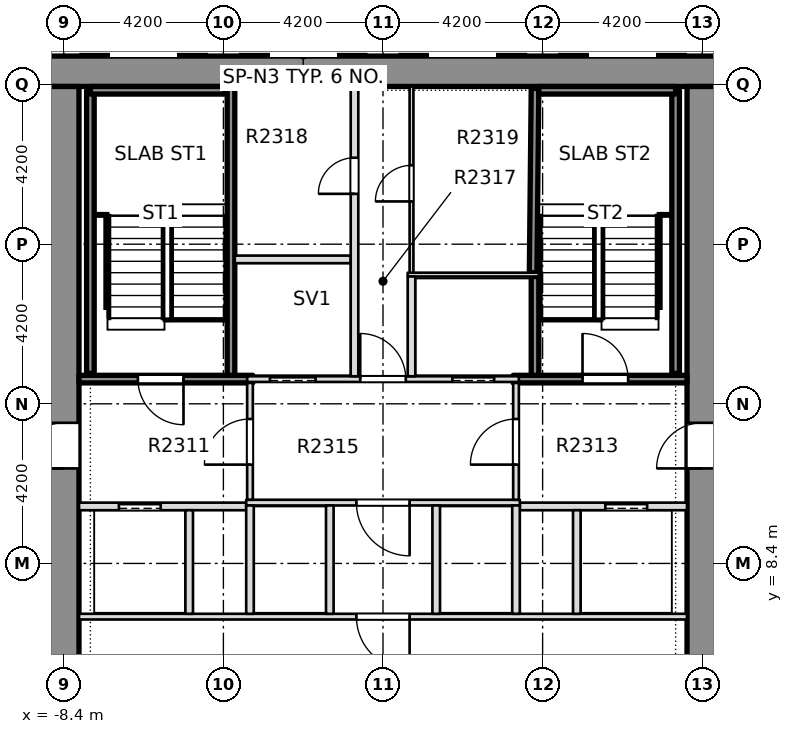
"""IFC4 building model, lengths in metres.
Left out: names, types, materials, properties, quantities, classifications, styles, units other than length and angle.
Written with IfcOpenShell. Run it as: python <this file> out.ifc"""

import sys

from ifc_helpers import new_model, si_unit, direction, frame, frame_2d, origin, place, context, subcontext, project, spatial, rectangle, extrude, element, fill, save


model = new_model("IFC4")
c1 = context("Model", 3, precision=1e-05, world=origin(), true_north=direction((0.0, 1.0)))
c2 = subcontext(c1, "Body", "Model", "MODEL_VIEW")
j1 = project(units=[si_unit("LENGTHUNIT", "METRE"), si_unit("PLANEANGLEUNIT", "RADIAN")], contexts=[c1])
p1 = place(None, origin())
s1 = spatial("IfcSite", under=j1, at=p1, CompositionType="ELEMENT")
p2 = place(p1, origin())
s2 = spatial("IfcBuilding", under=s1, at=p2, CompositionType="ELEMENT")
p3 = place(p2, frame((0.0, 0.0, 94.2)))
s3 = spatial("IfcBuildingStorey", under=s2, at=p3, CompositionType="ELEMENT", Elevation=94.2)
p4 = place(p3, frame((-11.8, 21.35, -0.32), z_axis=(0.0, 0.0, 1.0), x_axis=(1.0, 0.0, 0.0)))
e1 = element("IfcWall", 1, at=p4, inside=s3, PredefinedType="SHEAR", context=c2, shape_type="SweptSolid", body=[
    extrude(rectangle(XDim=23.6, YDim=0.8, at=frame_2d((11.8, 0.0))), origin(), (0.0, 0.0, 1.0), 3.45),
])
p5 = place(p3, frame((-8.4, -7.6, -0.32), z_axis=(0.0, 0.0, 1.0), x_axis=(0.0, 1.0, 0.0)))
e2 = element("IfcWall", 2, at=p5, inside=s3, PredefinedType="SHEAR", context=c2, shape_type="SweptSolid", body=[
    extrude(rectangle(XDim=28.55, YDim=0.8, at=frame_2d((14.275, 0.0))), origin(), (0.0, 0.0, 1.0), 3.45),
])
p6 = place(p5, frame((18.5, 0.0, 0.32)))
e3 = element("IfcOpeningElement", 3, at=p6, cuts=e2, PredefinedType="OPENING", context=c2, shape_type="SweptSolid", body=[
    extrude(rectangle(XDim=1.2, YDim=2.1, at=frame_2d((0.6, 1.05))), frame((0.0, 0.41, 0.0), z_axis=(0.0, -1.0, 0.0), x_axis=(1.0, 0.0, 0.0)), (0.0, 0.0, 1.0), 0.82),
])
p7 = place(p3, frame((8.4, -7.6, -0.32), z_axis=(0.0, 0.0, 1.0), x_axis=(0.0, 1.0, 0.0)))
e4 = element("IfcWall", 4, at=p7, inside=s3, PredefinedType="SHEAR", context=c2, shape_type="SweptSolid", body=[
    extrude(rectangle(XDim=28.55, YDim=0.8, at=frame_2d((14.275, 0.0))), origin(), (0.0, 0.0, 1.0), 3.45),
])
p8 = place(p7, frame((18.5, 0.0, 0.32)))
e5 = element("IfcOpeningElement", 5, at=p8, cuts=e4, PredefinedType="OPENING", context=c2, shape_type="SweptSolid", body=[
    extrude(rectangle(XDim=1.2, YDim=2.1, at=frame_2d((0.6, 1.05))), frame((0.0, 0.41, 0.0), z_axis=(0.0, -1.0, 0.0), x_axis=(1.0, 0.0, 0.0)), (0.0, 0.0, 1.0), 0.82),
])
p9 = place(p3, frame((-7.999, 7.0, 0.0), z_axis=(0.0, 0.0, 1.0), x_axis=(1.0, 0.0, 0.0)))
e6 = element("IfcWall", 6, at=p9, inside=s3, PredefinedType="PARTITIONING", context=c2, shape_type="SweptSolid", body=[
    extrude(rectangle(XDim=15.998, YDim=0.15, at=frame_2d((7.999, 0.0))), origin(), (0.0, 0.0, 1.0), 3.13),
])
p10 = place(p9, frame((7.299, 0.0, 0.0)))
e7 = element("IfcOpeningElement", 7, at=p10, cuts=e6, PredefinedType="OPENING", context=c2, shape_type="SweptSolid", body=[
    extrude(rectangle(XDim=1.4, YDim=2.1, at=frame_2d((0.7, 1.05))), frame((0.0, 0.085, 0.0), z_axis=(0.0, -1.0, 0.0), x_axis=(1.0, 0.0, 0.0)), (0.0, 0.0, 1.0), 0.17),
])
p11 = place(p3, frame((-7.999, 9.9, 0.0), z_axis=(0.0, 0.0, 1.0), x_axis=(1.0, 0.0, 0.0)))
e8 = element("IfcWall", 8, at=p11, inside=s3, PredefinedType="PARTITIONING", context=c2, shape_type="SweptSolid", body=[
    extrude(rectangle(XDim=4.399, YDim=0.2, at=frame_2d((2.199, 0.0))), origin(), (0.0, 0.0, 1.0), 3.13),
])
p12 = place(p11, frame((1.049, 0.0, 0.0)))
e9 = element("IfcOpeningElement", 9, at=p12, cuts=e8, PredefinedType="OPENING", context=c2, shape_type="SweptSolid", body=[
    extrude(rectangle(XDim=1.1, YDim=2.1, at=frame_2d((0.55, 1.05))), frame((0.0, 0.11, 0.0), z_axis=(0.0, -1.0, 0.0), x_axis=(1.0, 0.0, 0.0)), (0.0, 0.0, 1.0), 0.22),
])
p13 = place(p3, frame((3.6, 9.9, 0.0), z_axis=(0.0, 0.0, 1.0), x_axis=(1.0, 0.0, 0.0)))
e10 = element("IfcWall", 10, at=p13, inside=s3, PredefinedType="PARTITIONING", context=c2, shape_type="SweptSolid", body=[
    extrude(rectangle(XDim=4.399, YDim=0.2, at=frame_2d((2.199, 0.0))), origin(), (0.0, 0.0, 1.0), 3.13),
])
p14 = place(p13, frame((2.25, 0.0, 0.0)))
e11 = element("IfcOpeningElement", 11, at=p14, cuts=e10, PredefinedType="OPENING", context=c2, shape_type="SweptSolid", body=[
    extrude(rectangle(XDim=1.1, YDim=2.1, at=frame_2d((0.55, 1.05))), frame((0.0, 0.11, 0.0), z_axis=(0.0, -1.0, 0.0), x_axis=(1.0, 0.0, 0.0)), (0.0, 0.0, 1.0), 0.22),
])
p15 = place(p3, frame((-3.6, 10.0, 0.0), z_axis=(0.0, 0.0, 1.0), x_axis=(1.0, 0.0, 0.0)))
e12 = element("IfcWall", 12, at=p15, inside=s3, PredefinedType="PARTITIONING", context=c2, shape_type="SweptSolid", body=[
    extrude(rectangle(XDim=7.2, YDim=0.15, at=frame_2d((3.6, 0.0))), origin(), (0.0, 0.0, 1.0), 3.13),
])
p16 = place(p15, frame((2.9, 0.0, 0.0)))
e13 = element("IfcOpeningElement", 13, at=p16, cuts=e12, PredefinedType="OPENING", context=c2, shape_type="SweptSolid", body=[
    extrude(rectangle(XDim=1.4, YDim=2.1, at=frame_2d((0.7, 1.05))), frame((0.0, 0.085, 0.0), z_axis=(0.0, -1.0, 0.0), x_axis=(1.0, 0.0, 0.0)), (0.0, 0.0, 1.0), 0.17),
])
p17 = place(p3, frame((-7.999, 13.25, 0.0), z_axis=(0.0, 0.0, 1.0), x_axis=(1.0, 0.0, 0.0)))
e14 = element("IfcWall", 14, at=p17, inside=s3, PredefinedType="SOLIDWALL", context=c2, shape_type="SweptSolid", body=[
    extrude(rectangle(XDim=4.574, YDim=0.2, at=frame_2d((2.287, 0.0))), origin(), (0.0, 0.0, 1.0), 3.13),
])
p18 = place(p17, frame((1.549, 0.0, 0.0)))
e15 = element("IfcOpeningElement", 15, at=p18, cuts=e14, PredefinedType="OPENING", context=c2, shape_type="SweptSolid", body=[
    extrude(rectangle(XDim=1.2, YDim=2.1, at=frame_2d((0.6, 1.05))), frame((0.0, 0.11, 0.0), z_axis=(0.0, -1.0, 0.0), x_axis=(1.0, 0.0, 0.0)), (0.0, 0.0, 1.0), 0.22),
])
p19 = place(p3, frame((-3.575, 13.25, 0.0), z_axis=(0.0, 0.0, 1.0), x_axis=(1.0, 0.0, 0.0)))
e16 = element("IfcWall", 16, at=p19, inside=s3, PredefinedType="PARTITIONING", context=c2, shape_type="SweptSolid", body=[
    extrude(rectangle(XDim=7.15, YDim=0.15, at=frame_2d((3.575, 0.0))), origin(), (0.0, 0.0, 1.0), 3.13),
])
p20 = place(p19, frame((0.6, 0.0, 0.0)))
e17 = element("IfcOpeningElement", 17, at=p20, cuts=e16, PredefinedType="OPENING", context=c2, shape_type="SweptSolid", body=[
    extrude(rectangle(XDim=1.2, YDim=2.1, at=frame_2d((0.6, 1.05))), frame((0.0, 0.085, 0.0), z_axis=(0.0, -1.0, 0.0), x_axis=(1.0, 0.0, 0.0)), (0.0, 0.0, 1.0), 0.17),
])
p21 = place(p19, frame((5.4, 0.0, 0.0)))
e18 = element("IfcOpeningElement", 18, at=p21, cuts=e16, PredefinedType="OPENING", context=c2, shape_type="SweptSolid", body=[
    extrude(rectangle(XDim=1.1, YDim=2.1, at=frame_2d((0.55, 1.05))), frame((0.0, 0.085, 0.0), z_axis=(0.0, -1.0, 0.0), x_axis=(1.0, 0.0, 0.0)), (0.0, 0.0, 1.0), 0.17),
])
p22 = place(p19, frame((2.975, 0.0, 0.0)))
e19 = element("IfcOpeningElement", 19, at=p22, cuts=e16, PredefinedType="OPENING", context=c2, shape_type="SweptSolid", body=[
    extrude(rectangle(XDim=1.2, YDim=2.1, at=frame_2d((0.6, 1.05))), frame((0.0, 0.085, 0.0), z_axis=(0.0, -1.0, 0.0), x_axis=(1.0, 0.0, 0.0)), (0.0, 0.0, 1.0), 0.17),
])
p23 = place(p3, frame((3.425, 13.25, 0.0), z_axis=(0.0, 0.0, 1.0), x_axis=(1.0, 0.0, 0.0)))
e20 = element("IfcWall", 20, at=p23, inside=s3, PredefinedType="SOLIDWALL", context=c2, shape_type="SweptSolid", body=[
    extrude(rectangle(XDim=4.574, YDim=0.2, at=frame_2d((2.287, 0.0))), origin(), (0.0, 0.0, 1.0), 3.13),
])
p24 = place(p23, frame((1.825, 0.0, 0.0)))
e21 = element("IfcOpeningElement", 21, at=p24, cuts=e20, PredefinedType="OPENING", context=c2, shape_type="SweptSolid", body=[
    extrude(rectangle(XDim=1.2, YDim=2.1, at=frame_2d((0.6, 1.05))), frame((0.0, 0.11, 0.0), z_axis=(0.0, -1.0, 0.0), x_axis=(1.0, 0.0, 0.0)), (0.0, 0.0, 1.0), 0.22),
])
p25 = place(p3, frame((0.65, 16.0, 0.0), z_axis=(0.0, 0.0, 1.0), x_axis=(1.0, 0.0, 0.0)))
e22 = element("IfcWall", 22, at=p25, inside=s3, PredefinedType="PARTITIONING", context=c2, shape_type="SweptSolid", body=[
    extrude(rectangle(XDim=3.45, YDim=0.1, at=frame_2d((1.725, 0.0))), origin(), (0.0, 0.0, 1.0), 3.13),
])
p26 = place(p3, frame((-3.9, 16.4, 0.0), z_axis=(0.0, 0.0, 1.0), x_axis=(1.0, 0.0, 0.0)))
e23 = element("IfcWall", 23, at=p26, inside=s3, PredefinedType="PARTITIONING", context=c2, shape_type="SweptSolid", body=[
    extrude(rectangle(XDim=3.05, YDim=0.2, at=frame_2d((1.525, 0.0))), origin(), (0.0, 0.0, 1.0), 3.13),
])
p27 = place(p3, frame((-5.1, 7.075, 0.0), z_axis=(0.0, 0.0, 1.0), x_axis=(0.0, 1.0, 0.0)))
e24 = element("IfcWall", 24, at=p27, inside=s3, PredefinedType="PARTITIONING", context=c2, shape_type="SweptSolid", body=[
    extrude(rectangle(XDim=2.725, YDim=0.2, at=frame_2d((1.363, 0.0))), origin(), (0.0, 0.0, 1.0), 3.13),
])
p28 = place(p3, frame((-4.0, 13.35, 0.0), z_axis=(0.0, 0.0, 1.0), x_axis=(0.0, 1.0, 0.0)))
e25 = element("IfcWall", 25, at=p28, inside=s3, PredefinedType="SOLIDWALL", context=c2, shape_type="SweptSolid", body=[
    extrude(rectangle(XDim=7.599, YDim=0.2, at=frame_2d((3.799, 0.0))), origin(), (0.0, 0.0, 1.0), 3.13),
])
p29 = place(p3, frame((-3.5, 7.075, 0.0), z_axis=(0.0, 0.0, 1.0), x_axis=(0.0, 1.0, 0.0)))
e26 = element("IfcWall", 26, at=p29, inside=s3, PredefinedType="PARTITIONING", context=c2, shape_type="SweptSolid", body=[
    extrude(rectangle(XDim=2.85, YDim=0.2, at=frame_2d((1.425, 0.0))), origin(), (0.0, 0.0, 1.0), 3.13),
])
p30 = place(p3, frame((-3.5, 10.075, 0.0), z_axis=(0.0, 0.0, 1.0), x_axis=(0.0, 1.0, 0.0)))
e27 = element("IfcWall", 27, at=p30, inside=s3, PredefinedType="PARTITIONING", context=c2, shape_type="SweptSolid", body=[
    extrude(rectangle(XDim=3.075, YDim=0.15, at=frame_2d((1.538, 0.0))), origin(), (0.0, 0.0, 1.0), 3.13),
])
p31 = place(p30, frame((0.925, 0.0, 0.0)))
e28 = element("IfcOpeningElement", 28, at=p31, cuts=e27, PredefinedType="OPENING", context=c2, shape_type="SweptSolid", body=[
    extrude(rectangle(XDim=1.2, YDim=2.1, at=frame_2d((0.6, 1.05))), frame((0.0, 0.085, 0.0), z_axis=(0.0, -1.0, 0.0), x_axis=(1.0, 0.0, 0.0)), (0.0, 0.0, 1.0), 0.17),
])
p32 = place(p3, frame((-1.4, 7.075, 0.0), z_axis=(0.0, 0.0, 1.0), x_axis=(0.0, 1.0, 0.0)))
e29 = element("IfcWall", 29, at=p32, inside=s3, PredefinedType="PARTITIONING", context=c2, shape_type="SweptSolid", body=[
    extrude(rectangle(XDim=2.85, YDim=0.2, at=frame_2d((1.425, 0.0))), origin(), (0.0, 0.0, 1.0), 3.13),
])
p33 = place(p3, frame((-0.75, 13.325, 0.0), z_axis=(0.0, 0.0, 1.0), x_axis=(0.0, 1.0, 0.0)))
e30 = element("IfcWall", 30, at=p33, inside=s3, PredefinedType="PARTITIONING", context=c2, shape_type="SweptSolid", body=[
    extrude(rectangle(XDim=7.624, YDim=0.2, at=frame_2d((3.812, 0.0))), origin(), (0.0, 0.0, 1.0), 3.13),
])
p34 = place(p33, frame((4.8, 0.0, 0.0)))
e31 = element("IfcOpeningElement", 31, at=p34, cuts=e30, PredefinedType="OPENING", context=c2, shape_type="SweptSolid", body=[
    extrude(rectangle(XDim=0.95, YDim=2.1, at=frame_2d((0.475, 1.05))), frame((0.0, 0.11, 0.0), z_axis=(0.0, -1.0, 0.0), x_axis=(1.0, 0.0, 0.0)), (0.0, 0.0, 1.0), 0.22),
])
p35 = place(p3, frame((0.75, 13.325, 0.0), z_axis=(0.0, 0.0, 1.0), x_axis=(0.0, 1.0, 0.0)))
e32 = element("IfcWall", 32, at=p35, inside=s3, PredefinedType="PARTITIONING", context=c2, shape_type="SweptSolid", body=[
    extrude(rectangle(XDim=2.625, YDim=0.2, at=frame_2d((1.312, 0.0))), origin(), (0.0, 0.0, 1.0), 3.13),
])
p36 = place(p3, frame((0.75, 16.05, 0.0), z_axis=(0.0, 0.0, 1.0), x_axis=(0.0, 1.0, 0.0)))
e33 = element("IfcWall", 33, at=p36, inside=s3, PredefinedType="PARTITIONING", context=c2, shape_type="SweptSolid", body=[
    extrude(rectangle(XDim=4.899, YDim=0.1, at=frame_2d((2.449, 0.0))), origin(), (0.0, 0.0, 1.0), 3.13),
])
p37 = place(p36, frame((1.875, 0.0, 0.0)))
e34 = element("IfcOpeningElement", 34, at=p37, cuts=e33, PredefinedType="OPENING", context=c2, shape_type="SweptSolid", body=[
    extrude(rectangle(XDim=0.95, YDim=2.1, at=frame_2d((0.475, 1.05))), frame((0.0, 0.06, 0.0), z_axis=(0.0, -1.0, 0.0), x_axis=(1.0, 0.0, 0.0)), (0.0, 0.0, 1.0), 0.12),
])
for number, where, z_axis, x_axis in (
    (35, (1.4, 7.075, 0.0), (0.0, 0.0, 1.0), (0.0, 1.0, 0.0)),
    (36, (3.5, 7.075, 0.0), (0.0, 0.0, 1.0), (0.0, 1.0, 0.0)),
):
    element("IfcWall", number, at=place(p3, frame(where, z_axis=z_axis, x_axis=x_axis)), inside=s3, PredefinedType="PARTITIONING", context=c2, shape_type="SweptSolid", body=[
        extrude(rectangle(XDim=2.85, YDim=0.2, at=frame_2d((1.425, 0.0))), origin(), (0.0, 0.0, 1.0), 3.13),
    ])
p38 = place(p3, frame((3.5, 10.075, 0.0), z_axis=(0.0, 0.0, 1.0), x_axis=(0.0, 1.0, 0.0)))
e37 = element("IfcWall", 37, at=p38, inside=s3, PredefinedType="PARTITIONING", context=c2, shape_type="SweptSolid", body=[
    extrude(rectangle(XDim=3.075, YDim=0.15, at=frame_2d((1.538, 0.0))), origin(), (0.0, 0.0, 1.0), 3.13),
])
p39 = place(p38, frame((0.925, 0.0, 0.0)))
e38 = element("IfcOpeningElement", 38, at=p39, cuts=e37, PredefinedType="OPENING", context=c2, shape_type="SweptSolid", body=[
    extrude(rectangle(XDim=1.2, YDim=2.1, at=frame_2d((0.6, 1.05))), frame((0.0, 0.085, 0.0), z_axis=(0.0, -1.0, 0.0), x_axis=(1.0, 0.0, 0.0)), (0.0, 0.0, 1.0), 0.17),
])
p40 = place(p3, frame((4.0, 13.35, 0.0), z_axis=(0.0, 0.0, 1.0), x_axis=(0.0, 1.0, 0.0)))
e39 = element("IfcWall", 39, at=p40, inside=s3, PredefinedType="SOLIDWALL", context=c2, shape_type="SweptSolid", body=[
    extrude(rectangle(XDim=2.6, YDim=0.2, at=frame_2d((1.3, 0.0))), origin(), (0.0, 0.0, 1.0), 3.13),
])
p41 = place(p3, frame((3.95, 16.05, 0.0), z_axis=(0.0, 0.0, 1.0), x_axis=(0.01032118628, 0.999946735138, 0.0)))
e40 = element("IfcWall", 40, at=p41, inside=s3, PredefinedType="SOLIDWALL", context=c2, shape_type="SweptSolid", body=[
    extrude(rectangle(XDim=4.849, YDim=0.2, at=frame_2d((2.425, 0.0))), origin(), (0.0, 0.0, 1.0), 3.13),
])
p42 = place(p3, frame((5.1, 7.075, 0.0), z_axis=(0.0, 0.0, 1.0), x_axis=(0.0, 1.0, 0.0)))
e41 = element("IfcWall", 41, at=p42, inside=s3, PredefinedType="PARTITIONING", context=c2, shape_type="SweptSolid", body=[
    extrude(rectangle(XDim=2.725, YDim=0.2, at=frame_2d((1.363, 0.0))), origin(), (0.0, 0.0, 1.0), 3.13),
])
p43 = place(p3, frame((-7.7, 13.4, 0.0), z_axis=(0.0, 0.0, 1.0), x_axis=(0.0, 1.0, 0.0)))
e42 = element("IfcWall", 42, at=p43, inside=s3, PredefinedType="SOLIDWALL", context=c2, shape_type="SweptSolid", body=[
    extrude(rectangle(XDim=7.45, YDim=0.2, at=frame_2d((3.725, 0.0))), origin(), (0.0, 0.0, 1.0), 3.13),
])
p44 = place(p3, frame((-7.7, 20.85, 0.0), z_axis=(0.0, 0.0, 1.0), x_axis=(1.0, 0.0, 0.0)))
e43 = element("IfcWall", 43, at=p44, inside=s3, PredefinedType="SOLIDWALL", context=c2, shape_type="SweptSolid", body=[
    extrude(rectangle(XDim=3.55, YDim=0.2, at=frame_2d((1.775, 0.0))), origin(), (0.0, 0.0, 1.0), 3.13),
])
p45 = place(p3, frame((7.7, 13.4, 0.0), z_axis=(0.0, 0.0, 1.0), x_axis=(0.0, 1.0, 0.0)))
e44 = element("IfcWall", 44, at=p45, inside=s3, PredefinedType="SOLIDWALL", context=c2, shape_type="SweptSolid", body=[
    extrude(rectangle(XDim=7.45, YDim=0.2, at=frame_2d((3.725, 0.0))), origin(), (0.0, 0.0, 1.0), 3.13),
])
p46 = place(p3, frame((4.1, 20.85, 0.0), z_axis=(0.0, 0.0, 1.0), x_axis=(1.0, 0.0, 0.0)))
e45 = element("IfcWall", 45, at=p46, inside=s3, PredefinedType="SOLIDWALL", context=c2, shape_type="SweptSolid", body=[
    extrude(rectangle(XDim=3.6, YDim=0.2, at=frame_2d((1.8, 0.0))), origin(), (0.0, 0.0, 1.0), 3.13),
])
p47 = place(p18, origin())
e46 = element("IfcDoor", 46, at=p47, inside=s3, OperationType="SINGLE_SWING_LEFT", PredefinedType="DOOR", context=c2, shape_type="SweptSolid", body=[
    extrude(rectangle(XDim=1.2, YDim=2.1, at=frame_2d((0.6, 1.05))), frame((0.0, 0.025, 0.0), z_axis=(0.0, -1.0, 0.0), x_axis=(1.0, 0.0, 0.0)), (0.0, 0.0, 1.0), 0.05),
])
fill(e15, e46)
p48 = place(p12, origin())
e47 = element("IfcDoor", 47, at=p48, inside=s3, OperationType="SLIDING_TO_LEFT", PredefinedType="DOOR", context=c2, shape_type="SweptSolid", body=[
    extrude(rectangle(XDim=1.1, YDim=2.1, at=frame_2d((0.55, 1.05))), frame((0.0, 0.025, 0.0), z_axis=(0.0, -1.0, 0.0), x_axis=(1.0, 0.0, 0.0)), (0.0, 0.0, 1.0), 0.05),
])
fill(e9, e47)
p49 = place(p24, origin())
e48 = element("IfcDoor", 48, at=p49, inside=s3, OperationType="SINGLE_SWING_RIGHT", PredefinedType="DOOR", context=c2, shape_type="SweptSolid", body=[
    extrude(rectangle(XDim=1.2, YDim=2.1, at=frame_2d((0.6, 1.05))), frame((0.0, 0.025, 0.0), z_axis=(0.0, -1.0, 0.0), x_axis=(1.0, 0.0, 0.0)), (0.0, 0.0, 1.0), 0.05),
])
fill(e21, e48)
p50 = place(p14, origin())
e49 = element("IfcDoor", 49, at=p50, inside=s3, OperationType="SLIDING_TO_LEFT", PredefinedType="DOOR", context=c2, shape_type="SweptSolid", body=[
    extrude(rectangle(XDim=1.1, YDim=2.1, at=frame_2d((0.55, 1.05))), frame((0.0, 0.025, 0.0), z_axis=(0.0, -1.0, 0.0), x_axis=(1.0, 0.0, 0.0)), (0.0, 0.0, 1.0), 0.05),
])
fill(e11, e49)
p51 = place(p10, origin())
e50 = element("IfcDoor", 50, at=p51, inside=s3, OperationType="SINGLE_SWING_RIGHT", PredefinedType="DOOR", context=c2, shape_type="SweptSolid", body=[
    extrude(rectangle(XDim=1.4, YDim=2.1, at=frame_2d((0.7, 1.05))), frame((0.0, 0.025, 0.0), z_axis=(0.0, -1.0, 0.0), x_axis=(1.0, 0.0, 0.0)), (0.0, 0.0, 1.0), 0.05),
])
fill(e7, e50)
p52 = place(p16, origin())
e51 = element("IfcDoor", 51, at=p52, inside=s3, OperationType="SINGLE_SWING_RIGHT", PredefinedType="DOOR", context=c2, shape_type="SweptSolid", body=[
    extrude(rectangle(XDim=1.4, YDim=2.1, at=frame_2d((0.7, 1.05))), frame((0.0, 0.025, 0.0), z_axis=(0.0, -1.0, 0.0), x_axis=(1.0, 0.0, 0.0)), (0.0, 0.0, 1.0), 0.05),
])
fill(e13, e51)
p53 = place(p20, origin())
e52 = element("IfcDoor", 52, at=p53, inside=s3, OperationType="SLIDING_TO_RIGHT", PredefinedType="DOOR", context=c2, shape_type="SweptSolid", body=[
    extrude(rectangle(XDim=1.2, YDim=2.1, at=frame_2d((0.6, 1.05))), frame((0.0, 0.025, 0.0), z_axis=(0.0, -1.0, 0.0), x_axis=(1.0, 0.0, 0.0)), (0.0, 0.0, 1.0), 0.05),
])
fill(e17, e52)
p54 = place(p21, origin())
e53 = element("IfcDoor", 53, at=p54, inside=s3, OperationType="SLIDING_TO_LEFT", PredefinedType="DOOR", context=c2, shape_type="SweptSolid", body=[
    extrude(rectangle(XDim=1.1, YDim=2.1, at=frame_2d((0.55, 1.05))), frame((0.0, 0.025, 0.0), z_axis=(0.0, -1.0, 0.0), x_axis=(1.0, 0.0, 0.0)), (0.0, 0.0, 1.0), 0.05),
])
fill(e18, e53)
p55 = place(p22, origin())
e54 = element("IfcDoor", 54, at=p55, inside=s3, OperationType="SINGLE_SWING_RIGHT", PredefinedType="DOOR", context=c2, shape_type="SweptSolid", body=[
    extrude(rectangle(XDim=1.2, YDim=2.1, at=frame_2d((0.6, 1.05))), frame((0.0, 0.025, 0.0), z_axis=(0.0, -1.0, 0.0), x_axis=(1.0, 0.0, 0.0)), (0.0, 0.0, 1.0), 0.05),
])
fill(e19, e54)
p56 = place(p34, origin())
e55 = element("IfcDoor", 55, at=p56, inside=s3, OperationType="SINGLE_SWING_RIGHT", PredefinedType="DOOR", context=c2, shape_type="SweptSolid", body=[
    extrude(rectangle(XDim=0.95, YDim=2.1, at=frame_2d((0.475, 1.05))), frame((0.0, 0.025, 0.0), z_axis=(0.0, -1.0, 0.0), x_axis=(1.0, 0.0, 0.0)), (0.0, 0.0, 1.0), 0.05),
])
fill(e31, e55)
p57 = place(p37, origin())
e56 = element("IfcDoor", 56, at=p57, inside=s3, OperationType="SINGLE_SWING_LEFT", PredefinedType="DOOR", context=c2, shape_type="SweptSolid", body=[
    extrude(rectangle(XDim=0.95, YDim=2.1, at=frame_2d((0.475, 1.05))), frame((0.0, 0.025, 0.0), z_axis=(0.0, -1.0, 0.0), x_axis=(1.0, 0.0, 0.0)), (0.0, 0.0, 1.0), 0.05),
])
fill(e34, e56)
p58 = place(p31, origin())
e57 = element("IfcDoor", 57, at=p58, inside=s3, OperationType="SINGLE_SWING_RIGHT", PredefinedType="DOOR", context=c2, shape_type="SweptSolid", body=[
    extrude(rectangle(XDim=1.2, YDim=2.1, at=frame_2d((0.6, 1.05))), frame((0.0, 0.025, 0.0), z_axis=(0.0, -1.0, 0.0), x_axis=(1.0, 0.0, 0.0)), (0.0, 0.0, 1.0), 0.05),
])
fill(e28, e57)
p59 = place(p39, origin())
e58 = element("IfcDoor", 58, at=p59, inside=s3, OperationType="SINGLE_SWING_LEFT", PredefinedType="DOOR", context=c2, shape_type="SweptSolid", body=[
    extrude(rectangle(XDim=1.2, YDim=2.1, at=frame_2d((0.6, 1.05))), frame((0.0, 0.025, 0.0), z_axis=(0.0, -1.0, 0.0), x_axis=(1.0, 0.0, 0.0)), (0.0, 0.0, 1.0), 0.05),
])
fill(e38, e58)
p60 = place(p6, origin())
e59 = element("IfcDoor", 59, at=p60, inside=s3, OperationType="SINGLE_SWING_LEFT", PredefinedType="DOOR", context=c2, shape_type="SweptSolid", body=[
    extrude(rectangle(XDim=1.2, YDim=2.1, at=frame_2d((0.6, 1.05))), frame((0.0, 0.025, 0.0), z_axis=(0.0, -1.0, 0.0), x_axis=(1.0, 0.0, 0.0)), (0.0, 0.0, 1.0), 0.05),
])
fill(e3, e59)
p61 = place(p8, origin())
e60 = element("IfcDoor", 60, at=p61, inside=s3, OperationType="SINGLE_SWING_LEFT", PredefinedType="DOOR", context=c2, shape_type="SweptSolid", body=[
    extrude(rectangle(XDim=1.2, YDim=2.1, at=frame_2d((0.6, 1.05))), frame((0.0, 0.025, 0.0), z_axis=(0.0, -1.0, 0.0), x_axis=(1.0, 0.0, 0.0)), (0.0, 0.0, 1.0), 0.05),
])
fill(e5, e60)
save(model, sys.argv[1])
